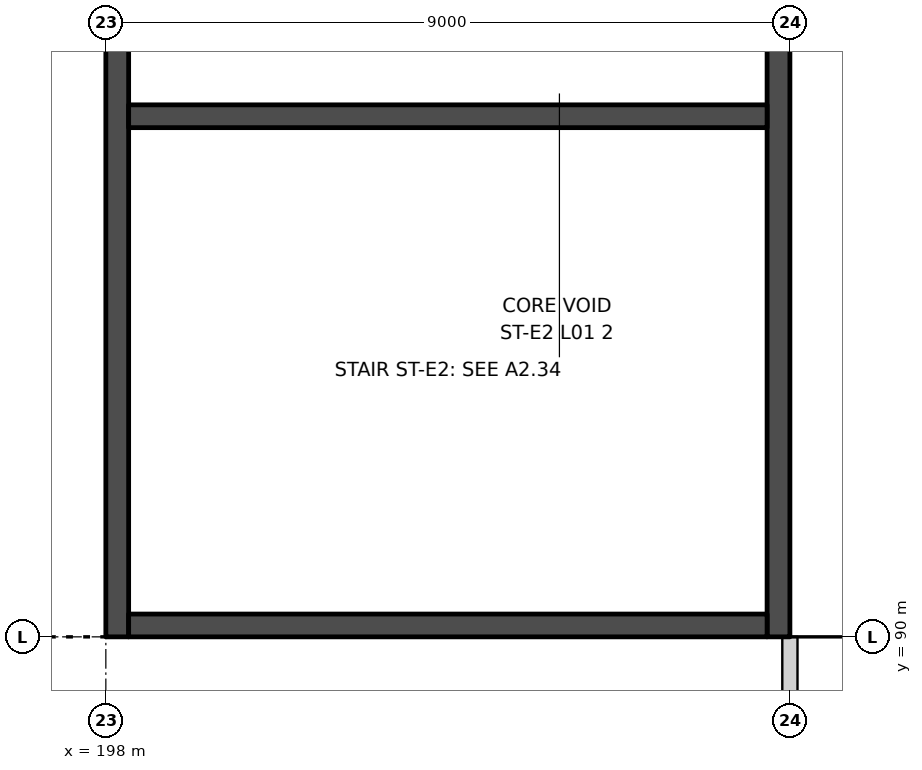
"""IFC4 building model, lengths in metres.
Left out: names, types, materials, properties, quantities, classifications, styles, units other than length and angle.
Written with IfcOpenShell. Run it as: python <this file> out.ifc"""

import sys

from ifc_helpers import new_model, si_unit, direction, frame, frame_2d, origin, place, context, subcontext, project, spatial, rectangle, extrude, element, save


model = new_model("IFC4")
c1 = context("Model", 3, precision=1e-05, world=origin(), true_north=direction((0.0, 1.0)))
c2 = subcontext(c1, "Body", "Model", "MODEL_VIEW")
j1 = project(units=[si_unit("LENGTHUNIT", "METRE"), si_unit("PLANEANGLEUNIT", "RADIAN")], contexts=[c1])
p1 = place(None, origin())
s1 = spatial("IfcSite", under=j1, at=p1, CompositionType="ELEMENT")
p2 = place(p1, origin())
s2 = spatial("IfcBuilding", under=s1, at=p2, CompositionType="ELEMENT")
p3 = place(p2, frame((0.0, 0.0, 7.0)))
s3 = spatial("IfcBuildingStorey", under=s2, at=p3, CompositionType="ELEMENT", Elevation=7.0)
p4 = place(p3, frame((207.0, 81.45, 0.0), z_axis=(0.0, 0.0, 1.0), x_axis=(0.0, 1.0, 0.0)))
e1 = element("IfcWall", 1, at=p4, inside=s3, PredefinedType="PARTITIONING", context=c2, shape_type="SweptSolid", body=[
    extrude(rectangle(XDim=8.55, YDim=0.2, at=frame_2d((4.275, 0.0))), origin(), (0.0, 0.0, 1.0), 3.25),
])
p5 = place(p3, frame((198.15, 108.0, 0.0), z_axis=(0.0, 0.0, 1.0), x_axis=(0.0, -1.0, 0.0)))
e2 = element("IfcWall", 2, at=p5, inside=s3, PredefinedType="SHEAR", context=c2, shape_type="SweptSolid", body=[
    extrude(rectangle(XDim=18.0, YDim=0.3, at=frame_2d((9.0, 0.0))), origin(), (0.0, 0.0, 1.0), 4.5),
])
p6 = place(p5, frame((1.5, 0.0, 0.0)))
e3 = element("IfcOpeningElement", 3, at=p6, cuts=e2, PredefinedType="OPENING", context=c2, shape_type="SweptSolid", body=[
    extrude(rectangle(XDim=1.2, YDim=2.1, at=frame_2d((0.6, 1.05))), frame((0.0, 0.16, 0.0), z_axis=(0.0, -1.0, 0.0), x_axis=(1.0, 0.0, 0.0)), (0.0, 0.0, 1.0), 0.32),
])
p7 = place(p3, frame((206.85, 108.0, 0.0), z_axis=(0.0, 0.0, 1.0), x_axis=(0.0, -1.0, 0.0)))
e4 = element("IfcWall", 4, at=p7, inside=s3, PredefinedType="SHEAR", context=c2, shape_type="SweptSolid", body=[
    extrude(rectangle(XDim=18.0, YDim=0.3, at=frame_2d((9.0, 0.0))), origin(), (0.0, 0.0, 1.0), 4.5),
])
for number, where, z_axis, x_axis in (
    (5, (198.3, 90.15, 0.0), (0.0, 0.0, 1.0), (1.0, 0.0, 0.0)),
    (6, (198.3, 96.85, 0.0), (0.0, 0.0, 1.0), (1.0, 0.0, 0.0)),
):
    element("IfcWall", number, at=place(p3, frame(where, z_axis=z_axis, x_axis=x_axis)), inside=s3, PredefinedType="SHEAR", context=c2, shape_type="SweptSolid", body=[
        extrude(rectangle(XDim=8.4, YDim=0.3, at=frame_2d((4.2, 0.0))), origin(), (0.0, 0.0, 1.0), 4.5),
    ])
save(model, sys.argv[1])
